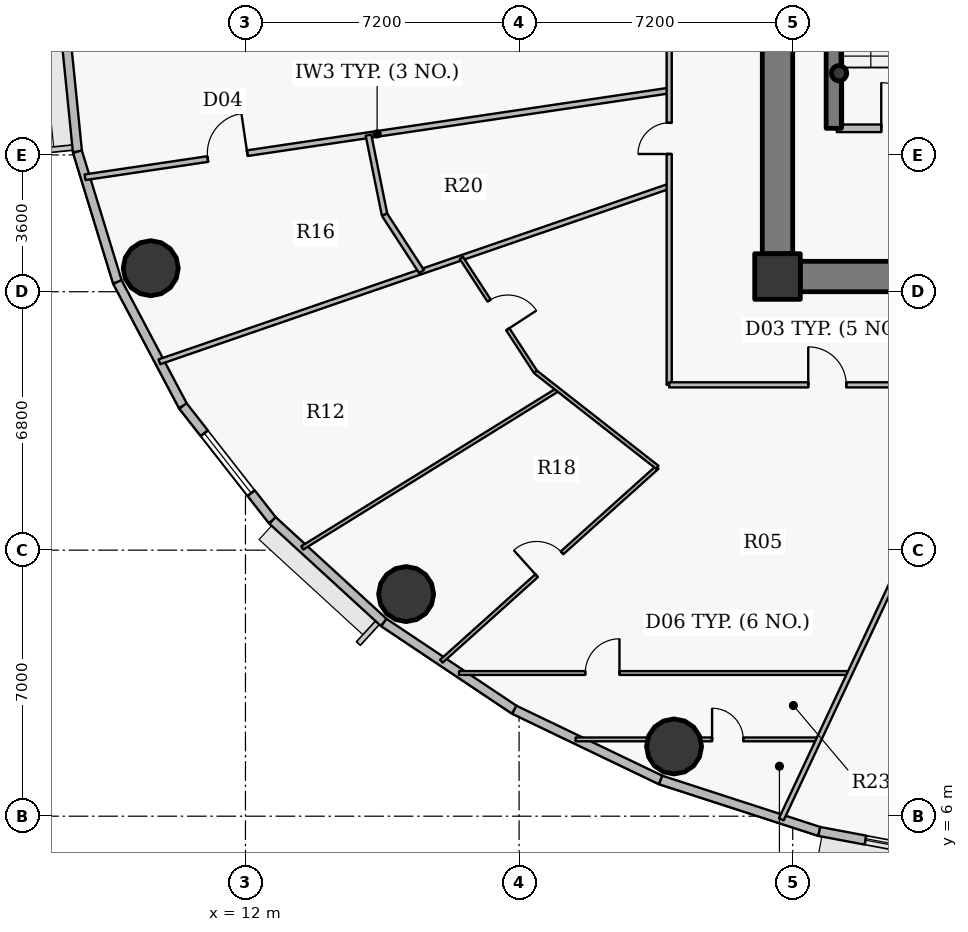
"""IFC4 building model, lengths in metres.
Left out: names, types, materials, properties, quantities, classifications, styles, units other than length and angle.
Written with IfcOpenShell. Run it as: python <this file> out.ifc"""

import sys

from ifc_helpers import new_model, si_unit, direction, frame, frame_2d, origin, origin_2d, place, context, subcontext, project, spatial, rectangle, hollow_circle, extrude, source, transform, mapped, element, fill, save


model = new_model("IFC4")
c1 = context("Model", 3, precision=1e-05, world=origin(), true_north=direction((0.0, 1.0)))
c2 = subcontext(c1, "Body", "Model", "MODEL_VIEW")
j1 = project(units=[si_unit("LENGTHUNIT", "METRE"), si_unit("PLANEANGLEUNIT", "RADIAN")], contexts=[c1])
p1 = place(None, origin())
s1 = spatial("IfcSite", under=j1, at=p1, CompositionType="ELEMENT")
p2 = place(p1, origin())
s2 = spatial("IfcBuilding", under=s1, at=p2, CompositionType="ELEMENT")
p3 = place(p2, frame((0.0, 0.0, 142.2)))
s3 = spatial("IfcBuildingStorey", under=s2, at=p3, CompositionType="ELEMENT", Elevation=142.2)
p4 = place(p3, frame((26.0, 20.2, 0.0), z_axis=(0.0, 0.0, 1.0), x_axis=(1.0, 0.0, 0.0)))
e1 = element("IfcColumn", 1, at=p4, inside=s3, PredefinedType="COLUMN", context=c2, shape_type="SweptSolid", body=[
    extrude(rectangle(XDim=1.2, YDim=1.2, at=origin_2d()), origin(), (0.0, 0.0, 1.0), 3.75),
])
p5 = place(p3, frame((27.48, 24.1, 0.0), z_axis=(0.0, 0.0, 1.0), x_axis=(0.0, 1.0, 0.0)))
e2 = element("IfcWall", 2, at=p5, inside=s3, PredefinedType="SHEAR", context=c2, shape_type="SweptSolid", body=[
    extrude(rectangle(XDim=8.6, YDim=0.4, at=frame_2d((4.3, 0.0))), origin(), (0.0, 0.0, 1.0), 3.75),
])
p6 = place(p3, frame((27.62, 25.55, 0.0), z_axis=(0.0, 0.0, 1.0), x_axis=(1.0, 0.0, 0.0)))
e3 = element("IfcColumn", 3, at=p6, inside=s3, PredefinedType="COLUMN", context=c2, shape_type="SweptSolid", body=[
    extrude(hollow_circle(Radius=0.203, WallThickness=0.016, at=origin_2d()), origin(), (0.0, 0.0, 1.0), 3.75),
])
p7 = place(p3, frame((45.4, 20.2, 0.0), z_axis=(0.0, 0.0, 1.0), x_axis=(-1.0, 0.0, 0.0)))
e4 = element("IfcWall", 4, at=p7, inside=s3, PredefinedType="SHEAR", context=c2, shape_type="SweptSolid", body=[
    extrude(rectangle(XDim=18.8, YDim=0.8, at=frame_2d((9.4, 0.0))), origin(), (0.0, 0.0, 1.0), 2.9),
])
p8 = place(p7, frame((10.15, 0.0, 0.0)))
e5 = element("IfcOpeningElement", 5, at=p8, cuts=e4, PredefinedType="OPENING", context=c2, shape_type="SweptSolid", body=[
    extrude(rectangle(XDim=1.15, YDim=2.15, at=origin_2d()), frame((0.575, 0.41, 1.075), z_axis=(0.0, -1.0, 0.0), x_axis=(1.0, 0.0, 0.0)), (0.0, 0.0, 1.0), 0.82),
])
p9 = place(p3, frame((26.0, 20.8, 0.0), z_axis=(0.0, 0.0, 1.0), x_axis=(0.0, 1.0, 0.0)))
e6 = element("IfcWall", 6, at=p9, inside=s3, PredefinedType="SHEAR", context=c2, shape_type="SweptSolid", body=[
    extrude(rectangle(XDim=12.4, YDim=0.8, at=frame_2d((6.2, 0.0))), origin(), (0.0, 0.0, 1.0), 2.9),
])
p10 = place(p9, frame((5.79, 0.0, 0.0)))
e7 = element("IfcOpeningElement", 7, at=p10, cuts=e6, PredefinedType="OPENING", context=c2, shape_type="SweptSolid", body=[
    extrude(rectangle(XDim=0.82, YDim=2.1, at=origin_2d()), frame((0.41, 0.41, 1.05), z_axis=(0.0, -1.0, 0.0), x_axis=(1.0, 0.0, 0.0)), (0.0, 0.0, 1.0), 0.82),
])
for number, where, z_axis, x_axis in (
    (8, (9.507, 20.419, 0.0), (0.0, 0.0, 1.0), (1.0, 0.0, 0.0)),
    (9, (16.227, 11.844, 0.0), (0.0, 0.0, 1.0), (1.0, 0.0, 0.0)),
    (10, (23.278, 7.835, 0.0), (0.0, 0.0, 1.0), (1.0, 0.0, 0.0)),
):
    element("IfcColumn", number, at=place(p3, frame(where, z_axis=z_axis, x_axis=x_axis)), inside=s3, PredefinedType="COLUMN", context=c2, shape_type="SweptSolid", body=[
        extrude(hollow_circle(Radius=0.725, WallThickness=0.042, at=origin_2d()), origin(), (0.0, 0.0, 1.0), 3.75),
    ])
p11 = place(p3, frame((7.578, 23.485, 0.0), z_axis=(0.0, 0.0, 1.0), x_axis=(-0.099989468229, 0.994988495533, 0.0)))
e11 = element("IfcWall", 11, at=p11, inside=s3, PredefinedType="SOLIDWALL", context=c2, shape_type="SweptSolid", body=[
    extrude(rectangle(XDim=3.533, YDim=0.24, at=frame_2d((1.767, 0.0))), origin(), (0.0, 0.0, 1.0), 3.45),
])
p12 = place(p3, frame((8.63, 20.055, 0.0), z_axis=(0.0, 0.0, 1.0), x_axis=(-0.293124431344, 0.956074300329, 0.0)))
e12 = element("IfcWall", 12, at=p12, inside=s3, PredefinedType="SOLIDWALL", context=c2, shape_type="SweptSolid", body=[
    extrude(rectangle(XDim=3.587, YDim=0.24, at=frame_2d((1.793, 0.0))), origin(), (0.0, 0.0, 1.0), 3.45),
])
p13 = place(p3, frame((10.355, 16.794, 0.0), z_axis=(0.0, 0.0, 1.0), x_axis=(-0.467614004126, 0.883932770716, 0.0)))
e13 = element("IfcWall", 13, at=p13, inside=s3, PredefinedType="SOLIDWALL", context=c2, shape_type="SweptSolid", body=[
    extrude(rectangle(XDim=3.689, YDim=0.24, at=frame_2d((1.844, 0.0))), origin(), (0.0, 0.0, 1.0), 3.45),
])
p14 = place(p3, frame((12.711, 13.783, 0.0), z_axis=(0.0, 0.0, 1.0), x_axis=(-0.616272103517, 0.787533297345, 0.0)))
e14 = element("IfcWall", 14, at=p14, inside=s3, PredefinedType="SOLIDWALL", context=c2, shape_type="SweptSolid", body=[
    extrude(rectangle(XDim=3.823, YDim=0.24, at=frame_2d((1.912, 0.0))), origin(), (0.0, 0.0, 1.0), 3.45),
])
p15 = place(p14, frame((0.912, 0.0, 0.9)))
e15 = element("IfcOpeningElement", 15, at=p15, cuts=e14, PredefinedType="OPENING", context=c2, shape_type="SweptSolid", body=[
    extrude(rectangle(XDim=2.0, YDim=1.75, at=origin_2d()), frame((1.0, 0.13, 0.875), z_axis=(0.0, -1.0, 0.0), x_axis=(1.0, 0.0, 0.0)), (0.0, 0.0, 1.0), 0.26),
])
p16 = place(p3, frame((15.642, 11.097, 0.0), z_axis=(0.0, 0.0, 1.0), x_axis=(-0.737113356241, 0.675769117414, 0.0)))
e16 = element("IfcWall", 16, at=p16, inside=s3, PredefinedType="SOLIDWALL", context=c2, shape_type="SweptSolid", body=[
    extrude(rectangle(XDim=3.976, YDim=0.24, at=frame_2d((1.988, 0.0))), origin(), (0.0, 0.0, 1.0), 3.45),
])
p17 = place(p3, frame((19.075, 8.801, 0.0), z_axis=(0.0, 0.0, 1.0), x_axis=(-0.831221811447, 0.555940914284, 0.0)))
e17 = element("IfcWall", 17, at=p17, inside=s3, PredefinedType="SOLIDWALL", context=c2, shape_type="SweptSolid", body=[
    extrude(rectangle(XDim=4.13, YDim=0.24, at=frame_2d((2.065, 0.0))), origin(), (0.0, 0.0, 1.0), 3.45),
])
p18 = place(p3, frame((22.926, 6.953, 0.0), z_axis=(0.0, 0.0, 1.0), x_axis=(-0.901589935876, 0.432591709962, 0.0)))
e18 = element("IfcWall", 18, at=p18, inside=s3, PredefinedType="SOLIDWALL", context=c2, shape_type="SweptSolid", body=[
    extrude(rectangle(XDim=4.272, YDim=0.24, at=frame_2d((2.136, 0.0))), origin(), (0.0, 0.0, 1.0), 3.45),
])
p19 = place(p3, frame((27.1, 5.599, 0.0), z_axis=(0.0, 0.0, 1.0), x_axis=(-0.951211346073, 0.308540070495, 0.0)))
e19 = element("IfcWall", 19, at=p19, inside=s3, PredefinedType="SOLIDWALL", context=c2, shape_type="SweptSolid", body=[
    extrude(rectangle(XDim=4.388, YDim=0.24, at=frame_2d((2.194, 0.0))), origin(), (0.0, 0.0, 1.0), 3.45),
])
p20 = place(p3, frame((31.494, 4.773, 0.0), z_axis=(0.0, 0.0, 1.0), x_axis=(-0.982789252177, 0.184730305596, 0.0)))
e20 = element("IfcWall", 20, at=p20, inside=s3, PredefinedType="SOLIDWALL", context=c2, shape_type="SweptSolid", body=[
    extrude(rectangle(XDim=4.471, YDim=0.24, at=frame_2d((2.235, 0.0))), origin(), (0.0, 0.0, 1.0), 3.45),
])
p21 = place(p20, frame((1.236, 0.0, 0.9)))
e21 = element("IfcOpeningElement", 21, at=p21, cuts=e20, PredefinedType="OPENING", context=c2, shape_type="SweptSolid", body=[
    extrude(rectangle(XDim=2.0, YDim=1.75, at=origin_2d()), frame((1.0, 0.13, 0.875), z_axis=(0.0, -1.0, 0.0), x_axis=(1.0, 0.0, 0.0)), (0.0, 0.0, 1.0), 0.26),
])
p22 = place(p3, frame((7.779, 22.812, 0.0), z_axis=(0.0, 0.0, 1.0), x_axis=(0.989169524168, 0.146777561148, 0.0)))
e22 = element("IfcWall", 22, at=p22, inside=s3, PredefinedType="PARTITIONING", context=c2, shape_type="SweptSolid", body=[
    extrude(rectangle(XDim=15.539, YDim=0.15, at=frame_2d((7.77, 0.0))), origin(), (0.0, 0.0, 1.0), 2.885),
])
p23 = place(p22, frame((3.265, 0.0, 0.0)))
e23 = element("IfcOpeningElement", 23, at=p23, cuts=e22, PredefinedType="OPENING", context=c2, shape_type="SweptSolid", body=[
    extrude(rectangle(XDim=1.05, YDim=2.15, at=origin_2d()), frame((0.525, 0.085, 1.075), z_axis=(0.0, -1.0, 0.0), x_axis=(1.0, 0.0, 0.0)), (0.0, 0.0, 1.0), 0.17),
])
p24 = place(p3, frame((9.735, 17.956, 0.0), z_axis=(0.0, 0.0, 1.0), x_axis=(0.945515704768, 0.325576491836, 0.0)))
e24 = element("IfcWall", 24, at=p24, inside=s3, PredefinedType="PARTITIONING", context=c2, shape_type="SweptSolid", body=[
    extrude(rectangle(XDim=14.188, YDim=0.135, at=frame_2d((7.094, 0.0))), origin(), (0.0, 0.0, 1.0), 2.885),
])
p25 = place(p3, frame((13.494, 13.059, 0.0), z_axis=(0.0, 0.0, 1.0), x_axis=(0.850110644983, 0.526604112486, 0.0)))
e25 = element("IfcWall", 25, at=p25, inside=s3, PredefinedType="PARTITIONING", context=c2, shape_type="SweptSolid", body=[
    extrude(rectangle(XDim=7.916, YDim=0.1, at=frame_2d((3.958, 0.0))), origin(), (0.0, 0.0, 1.0), 2.885),
])
p26 = place(p3, frame((15.237, 23.919, 0.0), z_axis=(0.0, 0.0, 1.0), x_axis=(0.198269330309, -0.98014757698, 0.0)))
e26 = element("IfcWall", 26, at=p26, inside=s3, PredefinedType="PARTITIONING", context=c2, shape_type="SweptSolid", body=[
    extrude(rectangle(XDim=2.136, YDim=0.15, at=frame_2d((1.068, 0.0))), origin(), (0.0, 0.0, 1.0), 2.885),
])
p27 = place(p3, frame((15.661, 21.825, 0.0), z_axis=(0.0, 0.0, 1.0), x_axis=(0.54543603077, -0.838152454114, 0.0)))
e27 = element("IfcWall", 27, at=p27, inside=s3, PredefinedType="PARTITIONING", context=c2, shape_type="SweptSolid", body=[
    extrude(rectangle(XDim=1.782, YDim=0.15, at=frame_2d((0.891, 0.0))), origin(), (0.0, 0.0, 1.0), 2.885),
])
p28 = place(p3, frame((17.155, 10.078, 0.0), z_axis=(0.0, 0.0, 1.0), x_axis=(0.744051955022, 0.668121761528, 0.0)))
e28 = element("IfcWall", 28, at=p28, inside=s3, PredefinedType="PARTITIONING", context=c2, shape_type="SweptSolid", body=[
    extrude(rectangle(XDim=7.636, YDim=0.1, at=frame_2d((3.818, 0.0))), origin(), (0.0, 0.0, 1.0), 2.885),
])
p29 = place(p28, frame((3.368, 0.0, 0.0)))
e29 = element("IfcOpeningElement", 29, at=p29, cuts=e28, PredefinedType="OPENING", context=c2, shape_type="SweptSolid", body=[
    extrude(rectangle(XDim=0.9, YDim=2.1, at=origin_2d()), frame((0.45, 0.06, 1.05), z_axis=(0.0, -1.0, 0.0), x_axis=(1.0, 0.0, 0.0)), (0.0, 0.0, 1.0), 0.12),
])
p30 = place(p3, frame((17.62, 9.768, 0.0), z_axis=(0.0, 0.0, 1.0), x_axis=(1.0, 0.0, 0.0)))
e30 = element("IfcWall", 30, at=p30, inside=s3, PredefinedType="PARTITIONING", context=c2, shape_type="SweptSolid", body=[
    extrude(rectangle(XDim=10.288, YDim=0.1, at=frame_2d((5.144, 0.0))), origin(), (0.0, 0.0, 1.0), 2.885),
])
p31 = place(p30, frame((3.322, 0.0, 0.0)))
e31 = element("IfcOpeningElement", 31, at=p31, cuts=e30, PredefinedType="OPENING", context=c2, shape_type="SweptSolid", body=[
    extrude(rectangle(XDim=0.9, YDim=2.1, at=origin_2d()), frame((0.45, 0.06, 1.05), z_axis=(0.0, -1.0, 0.0), x_axis=(1.0, 0.0, 0.0)), (0.0, 0.0, 1.0), 0.12),
])
p32 = place(p3, frame((17.68, 20.692, 0.0), z_axis=(0.0, 0.0, 1.0), x_axis=(0.545371539428, -0.838194418964, 0.0)))
e32 = element("IfcWall", 32, at=p32, inside=s3, PredefinedType="PARTITIONING", context=c2, shape_type="SweptSolid", body=[
    extrude(rectangle(XDim=3.583, YDim=0.1, at=frame_2d((1.791, 0.0))), origin(), (0.0, 0.0, 1.0), 3.45),
])
p33 = place(p32, frame((1.341, 0.0, 0.0)))
e33 = element("IfcOpeningElement", 33, at=p33, cuts=e32, PredefinedType="OPENING", context=c2, shape_type="SweptSolid", body=[
    extrude(rectangle(XDim=0.9, YDim=2.1, at=origin_2d()), frame((0.45, 0.06, 1.05), z_axis=(0.0, -1.0, 0.0), x_axis=(1.0, 0.0, 0.0)), (0.0, 0.0, 1.0), 0.12),
])
p34 = place(p3, frame((19.634, 17.689, 0.0), z_axis=(0.0, 0.0, 1.0), x_axis=(0.787341639438, -0.616516944461, 0.0)))
e34 = element("IfcWall", 34, at=p34, inside=s3, PredefinedType="PARTITIONING", context=c2, shape_type="SweptSolid", body=[
    extrude(rectangle(XDim=4.069, YDim=0.1, at=frame_2d((2.034, 0.0))), origin(), (0.0, 0.0, 1.0), 2.885),
])
p35 = place(p3, frame((20.688, 8.021, 0.0), z_axis=(0.0, 0.0, 1.0), x_axis=(1.0, 0.0, 0.0)))
e35 = element("IfcWall", 35, at=p35, inside=s3, PredefinedType="PARTITIONING", context=c2, shape_type="SweptSolid", body=[
    extrude(rectangle(XDim=6.399, YDim=0.1, at=frame_2d((3.2, 0.0))), origin(), (0.0, 0.0, 1.0), 2.885),
])
p36 = place(p35, frame((3.591, 0.0, 0.0)))
e36 = element("IfcOpeningElement", 36, at=p36, cuts=e35, PredefinedType="OPENING", context=c2, shape_type="SweptSolid", body=[
    extrude(rectangle(XDim=0.82, YDim=2.1, at=origin_2d()), frame((0.41, 0.06, 1.05), z_axis=(0.0, -1.0, 0.0), x_axis=(1.0, 0.0, 0.0)), (0.0, 0.0, 1.0), 0.12),
])
p37 = place(p3, frame((23.15, 17.35, 0.0), z_axis=(0.0, 0.0, 1.0), x_axis=(0.0, 1.0, 0.0)))
e37 = element("IfcWall", 37, at=p37, inside=s3, PredefinedType="PARTITIONING", context=c2, shape_type="SweptSolid", body=[
    extrude(rectangle(XDim=19.3, YDim=0.135, at=frame_2d((9.65, 0.0))), origin(), (0.0, 0.0, 1.0), 2.885),
])
p38 = place(p37, frame((11.733, 0.0, 0.0)))
e38 = element("IfcOpeningElement", 38, at=p38, cuts=e37, PredefinedType="OPENING", context=c2, shape_type="SweptSolid", body=[
    extrude(rectangle(XDim=1.05, YDim=2.15, at=origin_2d()), frame((0.525, 0.078, 1.075), z_axis=(0.0, -1.0, 0.0), x_axis=(1.0, 0.0, 0.0)), (0.0, 0.0, 1.0), 0.155),
])
p39 = place(p37, frame((6.074, 0.0, 0.0)))
e39 = element("IfcOpeningElement", 39, at=p39, cuts=e37, PredefinedType="OPENING", context=c2, shape_type="SweptSolid", body=[
    extrude(rectangle(XDim=0.82, YDim=2.1, at=origin_2d()), frame((0.41, 0.078, 1.05), z_axis=(0.0, -1.0, 0.0), x_axis=(1.0, 0.0, 0.0)), (0.0, 0.0, 1.0), 0.155),
])
p40 = place(p3, frame((23.15, 17.35, 0.0), z_axis=(0.0, 0.0, 1.0), x_axis=(1.0, 0.0, 0.0)))
e40 = element("IfcWall", 40, at=p40, inside=s3, PredefinedType="PARTITIONING", context=c2, shape_type="SweptSolid", body=[
    extrude(rectangle(XDim=8.318, YDim=0.135, at=frame_2d((4.159, 0.0))), origin(), (0.0, 0.0, 1.0), 2.885),
])
p41 = place(p40, frame((3.659, 0.0, 0.0)))
e41 = element("IfcOpeningElement", 41, at=p41, cuts=e40, PredefinedType="OPENING", context=c2, shape_type="SweptSolid", body=[
    extrude(rectangle(XDim=1.0, YDim=2.15, at=origin_2d()), frame((0.5, 0.078, 1.075), z_axis=(0.0, -1.0, 0.0), x_axis=(1.0, 0.0, 0.0)), (0.0, 0.0, 1.0), 0.155),
])
p42 = place(p3, frame((26.1, 5.918, 0.0), z_axis=(0.0, 0.0, 1.0), x_axis=(0.425072644526, 0.905159238408, 0.0)))
e42 = element("IfcWall", 42, at=p42, inside=s3, PredefinedType="PARTITIONING", context=c2, shape_type="SweptSolid", body=[
    extrude(rectangle(XDim=12.63, YDim=0.135, at=frame_2d((6.315, 0.0))), origin(), (0.0, 0.0, 1.0), 2.885),
])
p43 = place(p3, frame((27.56, 24.1, 0.0), z_axis=(0.0, 0.0, 1.0), x_axis=(1.0, 0.0, 0.0)))
e43 = element("IfcWall", 43, at=p43, inside=s3, PredefinedType="PARTITIONING", context=c2, shape_type="SweptSolid", body=[
    extrude(rectangle(XDim=3.54, YDim=0.2, at=frame_2d((1.77, 0.0))), origin(), (0.0, 0.0, 1.0), 3.45),
])
p44 = place(p43, frame((1.17, 0.0, 0.0)))
e44 = element("IfcOpeningElement", 44, at=p44, cuts=e43, PredefinedType="OPENING", context=c2, shape_type="SweptSolid", body=[
    extrude(rectangle(XDim=1.2, YDim=2.15, at=origin_2d()), frame((0.6, 0.11, 1.075), z_axis=(0.0, -1.0, 0.0), x_axis=(1.0, 0.0, 0.0)), (0.0, 0.0, 1.0), 0.22),
])
p45 = place(p3, frame((25.6, 20.79, 0.0), z_axis=(0.0, 0.0, 1.0), x_axis=(0.0, -1.0, 0.0)))
e45 = element("IfcWall", 45, at=p45, inside=s3, PredefinedType="PARTITIONING", context=c2, shape_type="SweptSolid", body=[
    extrude(rectangle(XDim=0.99, YDim=0.135, at=frame_2d((0.495, 0.0))), origin(), (0.0, 0.0, 1.0), 3.45),
])
p46 = place(p3, frame((25.907, 19.8, 0.0), z_axis=(0.0, 0.0, 1.0), x_axis=(1.0, 0.0, 0.0)))
e46 = element("IfcWall", 46, at=p46, inside=s3, PredefinedType="PARTITIONING", context=c2, shape_type="SweptSolid", body=[
    extrude(rectangle(XDim=0.683, YDim=0.135, at=frame_2d((0.341, 0.0))), origin(), (0.0, 0.0, 1.0), 2.885),
])
m1 = source(origin(), c2, "Body", "SweptSolid", [
    extrude(rectangle(XDim=2.0, YDim=1.75, at=origin_2d()), frame((1.0, 0.03, 0.875), z_axis=(0.0, -1.0, 0.0), x_axis=(1.0, 0.0, 0.0)), (0.0, 0.0, 1.0), 0.06),
])
p47 = place(p15, origin())
e47 = element("IfcWindow", 47, at=p47, inside=s3, PartitioningType="DOUBLE_PANEL_VERTICAL", PredefinedType="WINDOW", context=c2, shape_type="MappedRepresentation", body=[
    mapped(m1, transform((0.0, 0.0, 0.0), x_axis=(1.0, 0.0, 0.0), y_axis=(0.0, 1.0, 0.0), z_axis=(0.0, 0.0, 1.0), scale=1.0)),
])
fill(e15, e47)
p48 = place(p21, origin())
e48 = element("IfcWindow", 48, at=p48, inside=s3, PartitioningType="DOUBLE_PANEL_VERTICAL", PredefinedType="WINDOW", context=c2, shape_type="MappedRepresentation", body=[
    mapped(m1, transform((0.0, 0.0, 0.0), x_axis=(1.0, 0.0, 0.0), y_axis=(0.0, 1.0, 0.0), z_axis=(0.0, 0.0, 1.0), scale=1.0)),
])
fill(e21, e48)
m2 = source(origin(), c2, "Body", "SweptSolid", [
    extrude(rectangle(XDim=1.2, YDim=2.15, at=origin_2d()), frame((0.6, 0.025, 1.075), z_axis=(0.0, -1.0, 0.0), x_axis=(1.0, 0.0, 0.0)), (0.0, 0.0, 1.0), 0.05),
])
p49 = place(p44, origin())
e49 = element("IfcDoor", 49, at=p49, inside=s3, OperationType="SINGLE_SWING_LEFT", PredefinedType="DOOR", context=c2, shape_type="MappedRepresentation", body=[
    mapped(m2, transform((0.0, 0.0, 0.0), x_axis=(1.0, 0.0, 0.0), y_axis=(0.0, 1.0, 0.0), z_axis=(0.0, 0.0, 1.0), scale=1.0)),
])
fill(e44, e49)
m3 = source(origin(), c2, "Body", "SweptSolid", [
    extrude(rectangle(XDim=1.0, YDim=2.15, at=origin_2d()), frame((0.5, 0.025, 1.075), z_axis=(0.0, -1.0, 0.0), x_axis=(1.0, 0.0, 0.0)), (0.0, 0.0, 1.0), 0.05),
])
p50 = place(p41, origin())
e50 = element("IfcDoor", 50, at=p50, inside=s3, OperationType="SINGLE_SWING_LEFT", PredefinedType="DOOR", context=c2, shape_type="MappedRepresentation", body=[
    mapped(m3, transform((0.0, 0.0, 0.0), x_axis=(1.0, 0.0, 0.0), y_axis=(0.0, 1.0, 0.0), z_axis=(0.0, 0.0, 1.0), scale=1.0)),
])
fill(e41, e50)
m4 = source(origin(), c2, "Body", "SweptSolid", [
    extrude(rectangle(XDim=0.9, YDim=2.1, at=origin_2d()), frame((0.45, 0.025, 1.05), z_axis=(0.0, -1.0, 0.0), x_axis=(1.0, 0.0, 0.0)), (0.0, 0.0, 1.0), 0.05),
])
p51 = place(p33, origin())
e51 = element("IfcDoor", 51, at=p51, inside=s3, OperationType="SINGLE_SWING_RIGHT", PredefinedType="DOOR", context=c2, shape_type="MappedRepresentation", body=[
    mapped(m4, transform((0.0, 0.0, 0.0), x_axis=(1.0, 0.0, 0.0), y_axis=(0.0, 1.0, 0.0), z_axis=(0.0, 0.0, 1.0), scale=1.0)),
])
fill(e33, e51)
p52 = place(p29, origin())
e52 = element("IfcDoor", 52, at=p52, inside=s3, OperationType="SINGLE_SWING_LEFT", PredefinedType="DOOR", context=c2, shape_type="MappedRepresentation", body=[
    mapped(m4, transform((0.0, 0.0, 0.0), x_axis=(1.0, 0.0, 0.0), y_axis=(0.0, 1.0, 0.0), z_axis=(0.0, 0.0, 1.0), scale=1.0)),
])
fill(e29, e52)
p53 = place(p31, origin())
e53 = element("IfcDoor", 53, at=p53, inside=s3, OperationType="SINGLE_SWING_RIGHT", PredefinedType="DOOR", context=c2, shape_type="MappedRepresentation", body=[
    mapped(m4, transform((0.0, 0.0, 0.0), x_axis=(1.0, 0.0, 0.0), y_axis=(0.0, 1.0, 0.0), z_axis=(0.0, 0.0, 1.0), scale=1.0)),
])
fill(e31, e53)
m5 = source(origin(), c2, "Body", "SweptSolid", [
    extrude(rectangle(XDim=0.82, YDim=2.1, at=origin_2d()), frame((0.41, 0.025, 1.05), z_axis=(0.0, -1.0, 0.0), x_axis=(1.0, 0.0, 0.0)), (0.0, 0.0, 1.0), 0.05),
])
p54 = place(p36, origin())
e54 = element("IfcDoor", 54, at=p54, inside=s3, OperationType="SINGLE_SWING_LEFT", PredefinedType="DOOR", context=c2, shape_type="MappedRepresentation", body=[
    mapped(m5, transform((0.0, 0.0, 0.0), x_axis=(1.0, 0.0, 0.0), y_axis=(0.0, 1.0, 0.0), z_axis=(0.0, 0.0, 1.0), scale=1.0)),
])
fill(e36, e54)
p55 = place(p39, origin())
e55 = element("IfcDoor", 55, at=p55, inside=s3, OperationType="SINGLE_SWING_LEFT", PredefinedType="DOOR", context=c2, shape_type="MappedRepresentation", body=[
    mapped(m5, transform((0.0, 0.0, 0.0), x_axis=(1.0, 0.0, 0.0), y_axis=(0.0, 1.0, 0.0), z_axis=(0.0, 0.0, 1.0), scale=1.0)),
])
fill(e39, e55)
m6 = source(origin(), c2, "Body", "SweptSolid", [
    extrude(rectangle(XDim=1.05, YDim=2.15, at=origin_2d()), frame((0.525, 0.025, 1.075), z_axis=(0.0, -1.0, 0.0), x_axis=(1.0, 0.0, 0.0)), (0.0, 0.0, 1.0), 0.05),
])
p56 = place(p23, origin())
e56 = element("IfcDoor", 56, at=p56, inside=s3, OperationType="SINGLE_SWING_RIGHT", PredefinedType="DOOR", context=c2, shape_type="MappedRepresentation", body=[
    mapped(m6, transform((0.0, 0.0, 0.0), x_axis=(1.0, 0.0, 0.0), y_axis=(0.0, 1.0, 0.0), z_axis=(0.0, 0.0, 1.0), scale=1.0)),
])
fill(e23, e56)
save(model, sys.argv[1])
